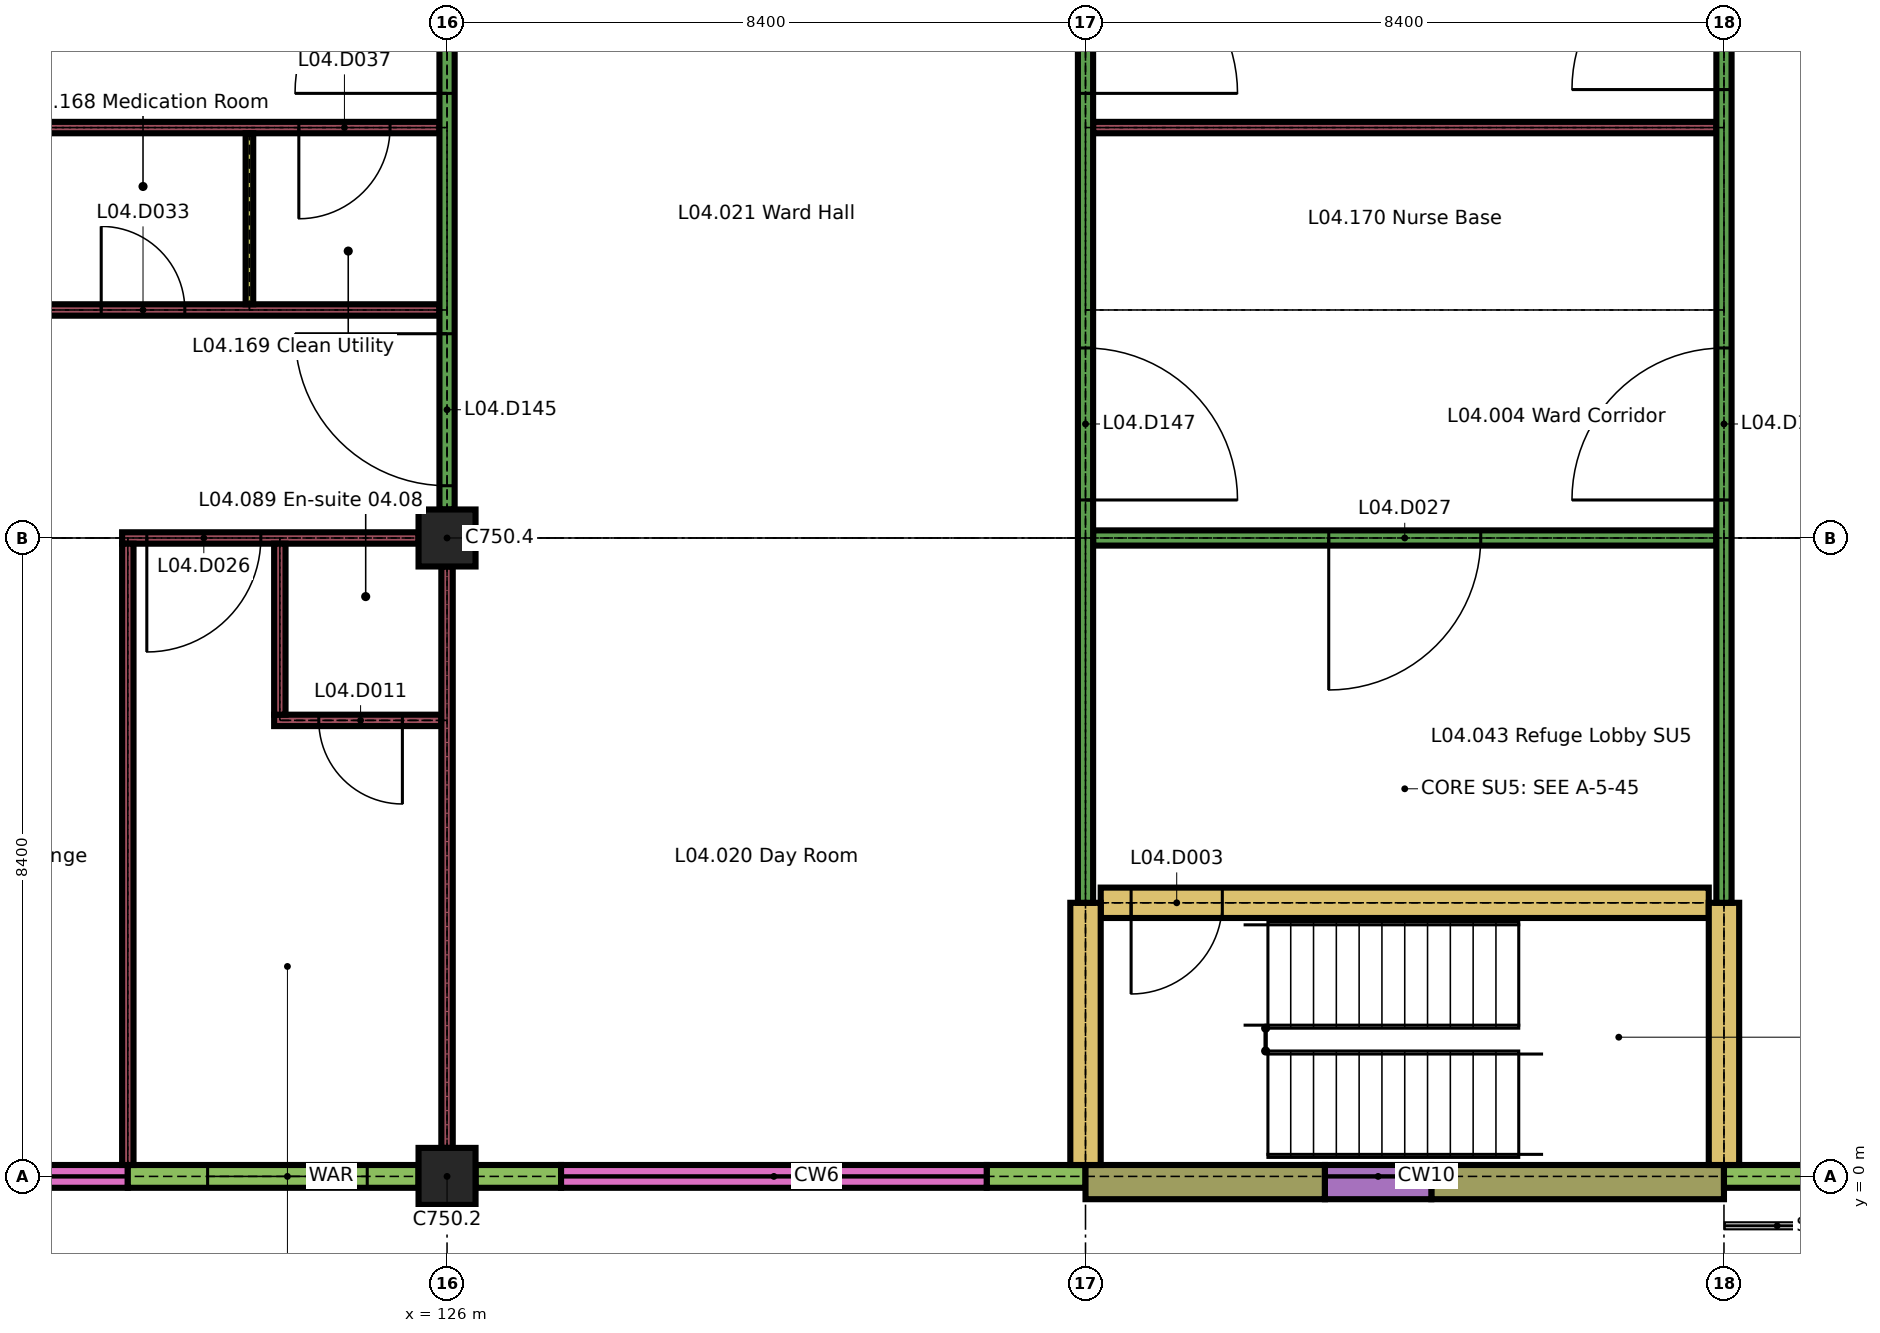
"""IFC4 building model, lengths in metres.
Left out: names, types, materials, properties, quantities, classifications, styles, units other than length and angle.
Written with IfcOpenShell. Run it as: python <this file> out.ifc"""

import sys

from ifc_helpers import new_model, si_unit, direction, frame, frame_2d, origin, origin_2d, place, context, subcontext, project, spatial, rectangle, extrude, element, fill, save


model = new_model("IFC4")
c1 = context("Model", 3, precision=1e-05, world=origin(), true_north=direction((0.0, 1.0)))
c2 = subcontext(c1, "Body", "Model", "MODEL_VIEW")
j1 = project(units=[si_unit("LENGTHUNIT", "METRE"), si_unit("PLANEANGLEUNIT", "RADIAN")], contexts=[c1])
p1 = place(None, origin())
s1 = spatial("IfcSite", under=j1, at=p1, CompositionType="ELEMENT")
p2 = place(p1, origin())
s2 = spatial("IfcBuilding", under=s1, at=p2, CompositionType="ELEMENT")
p3 = place(p2, frame((0.0, 0.0, 18.9)))
s3 = spatial("IfcBuildingStorey", under=s2, at=p3, CompositionType="ELEMENT", Elevation=18.9)
for number, where, z_axis, x_axis in (
    (1, (126.0, 0.0, 0.0), (0.0, 0.0, 1.0), (1.0, 0.0, 0.0)),
    (2, (126.0, 8.4, 0.0), (0.0, 0.0, 1.0), (1.0, 0.0, 0.0)),
):
    element("IfcColumn", number, at=place(p3, frame(where, z_axis=z_axis, x_axis=x_axis)), inside=s3, PredefinedType="COLUMN", context=c2, shape_type="SweptSolid", body=[
        extrude(rectangle(XDim=0.75, YDim=0.75, at=origin_2d()), origin(), (0.0, 0.0, 1.0), 3.26),
    ])
p4 = place(p3, frame((117.975, 0.0, 0.0), z_axis=(0.0, 0.0, 1.0), x_axis=(1.0, 0.0, 0.0)))
e3 = element("IfcWall", 3, at=p4, inside=s3, PredefinedType="SOLIDWALL", context=c2, shape_type="SweptSolid", body=[
    extrude(rectangle(XDim=3.825, YDim=0.3, at=frame_2d((1.913, 0.0))), origin(), (0.0, 0.0, 1.0), 0.6),
])
p5 = place(p3, frame((121.8, 0.0, 0.0), z_axis=(0.0, 0.0, 1.0), x_axis=(1.0, 0.0, 0.0)))
e4 = element("IfcWall", 4, at=p5, inside=s3, PredefinedType="SOLIDWALL", context=c2, shape_type="SweptSolid", body=[
    extrude(rectangle(XDim=3.825, YDim=0.3, at=frame_2d((1.913, 0.0))), origin(), (0.0, 0.0, 1.0), 2.96),
])
p6 = place(p5, frame((1.05, 0.0, 0.9)))
e5 = element("IfcOpeningElement", 5, at=p6, cuts=e4, PredefinedType="OPENING", context=c2, shape_type="SweptSolid", body=[
    extrude(rectangle(XDim=2.1, YDim=1.5, at=frame_2d((1.05, 0.75))), frame((0.0, 0.16, 0.0), z_axis=(0.0, -1.0, 0.0), x_axis=(1.0, 0.0, 0.0)), (0.0, 0.0, 1.0), 0.32),
])
p7 = place(p3, frame((126.375, 0.0, 0.0), z_axis=(0.0, 0.0, 1.0), x_axis=(1.0, 0.0, 0.0)))
e6 = element("IfcWall", 6, at=p7, inside=s3, PredefinedType="SOLIDWALL", context=c2, shape_type="SweptSolid", body=[
    extrude(rectangle(XDim=1.125, YDim=0.3, at=frame_2d((0.562, 0.0))), origin(), (0.0, 0.0, 1.0), 2.96),
])
p8 = place(p3, frame((133.1, 0.0, 0.0), z_axis=(0.0, 0.0, 1.0), x_axis=(1.0, 0.0, 0.0)))
e7 = element("IfcWall", 7, at=p8, inside=s3, PredefinedType="SOLIDWALL", context=c2, shape_type="SweptSolid", body=[
    extrude(rectangle(XDim=1.3, YDim=0.3, at=frame_2d((0.65, 0.0))), origin(), (0.0, 0.0, 1.0), 2.96),
])
p9 = place(p3, frame((127.5, 0.0, 0.0), z_axis=(0.0, 0.0, 1.0), x_axis=(1.0, 0.0, 0.0)))
e8 = element("IfcWall", 8, at=p9, inside=s3, PredefinedType="SOLIDWALL", context=c2, shape_type="SweptSolid", body=[
    extrude(rectangle(XDim=5.6, YDim=0.3, at=frame_2d((2.8, 0.0))), origin(), (0.0, 0.0, 1.0), 0.6),
])
p10 = place(p3, frame((134.4, -0.075, 0.0), z_axis=(0.0, 0.0, 1.0), x_axis=(1.0, 0.0, 0.0)))
e9 = element("IfcWall", 9, at=p10, inside=s3, PredefinedType="SOLIDWALL", context=c2, shape_type="SweptSolid", body=[
    extrude(rectangle(XDim=3.15, YDim=0.45, at=frame_2d((1.575, 0.0))), origin(), (0.0, 0.0, 1.0), 3.26),
])
p11 = place(p3, frame((138.95, -0.075, 0.0), z_axis=(0.0, 0.0, 1.0), x_axis=(1.0, 0.0, 0.0)))
e10 = element("IfcWall", 10, at=p11, inside=s3, PredefinedType="SOLIDWALL", context=c2, shape_type="SweptSolid", body=[
    extrude(rectangle(XDim=3.85, YDim=0.45, at=frame_2d((1.925, 0.0))), origin(), (0.0, 0.0, 1.0), 3.26),
])
p12 = place(p3, frame((137.55, -0.075, 0.0), z_axis=(0.0, 0.0, 1.0), x_axis=(1.0, 0.0, 0.0)))
e11 = element("IfcWall", 11, at=p12, inside=s3, PredefinedType="SOLIDWALL", context=c2, shape_type="SweptSolid", body=[
    extrude(rectangle(XDim=1.4, YDim=0.45, at=frame_2d((0.7, 0.0))), origin(), (0.0, 0.0, 1.0), 0.6),
])
p13 = place(p3, frame((142.8, 0.0, 0.0), z_axis=(0.0, 0.0, 1.0), x_axis=(1.0, 0.0, 0.0)))
e12 = element("IfcWall", 12, at=p13, inside=s3, PredefinedType="SOLIDWALL", context=c2, shape_type="SweptSolid", body=[
    extrude(rectangle(XDim=1.3, YDim=0.3, at=frame_2d((0.65, 0.0))), origin(), (0.0, 0.0, 1.0), 2.96),
])
p14 = place(p3, frame((134.6, 3.6, 0.0), z_axis=(0.0, 0.0, 1.0), x_axis=(1.0, 0.0, 0.0)))
e13 = element("IfcWall", 13, at=p14, inside=s3, PredefinedType="SHEAR", context=c2, shape_type="SweptSolid", body=[
    extrude(rectangle(XDim=8.0, YDim=0.4, at=frame_2d((4.0, 0.0))), origin(), (0.0, 0.0, 1.0), 3.26),
])
p15 = place(p14, frame((0.4, 0.0, 0.0)))
e14 = element("IfcOpeningElement", 14, at=p15, cuts=e13, PredefinedType="OPENING", context=c2, shape_type="SweptSolid", body=[
    extrude(rectangle(XDim=1.2, YDim=2.1, at=frame_2d((0.6, 1.05))), frame((0.0, 0.21, 0.0), z_axis=(0.0, -1.0, 0.0), x_axis=(1.0, 0.0, 0.0)), (0.0, 0.0, 1.0), 0.42),
])
p16 = place(p3, frame((123.725, 6.0, 0.0), z_axis=(0.0, 0.0, 1.0), x_axis=(1.0, 0.0, 0.0)))
e15 = element("IfcWall", 15, at=p16, inside=s3, PredefinedType="PARTITIONING", context=c2, shape_type="SweptSolid", body=[
    extrude(rectangle(XDim=2.2, YDim=0.15, at=frame_2d((1.1, 0.0))), origin(), (0.0, 0.0, 1.0), 3.26),
])
p17 = place(p16, frame((0.587, 0.0, 0.0)))
e16 = element("IfcOpeningElement", 16, at=p17, cuts=e15, PredefinedType="OPENING", context=c2, shape_type="SweptSolid", body=[
    extrude(rectangle(XDim=1.1, YDim=2.1, at=frame_2d((0.55, 1.05))), frame((0.0, 0.085, 0.0), z_axis=(0.0, -1.0, 0.0), x_axis=(1.0, 0.0, 0.0)), (0.0, 0.0, 1.0), 0.17),
])
p18 = place(p3, frame((121.725, 8.4, 0.0), z_axis=(0.0, 0.0, 1.0), x_axis=(1.0, 0.0, 0.0)))
e17 = element("IfcWall", 17, at=p18, inside=s3, PredefinedType="PARTITIONING", context=c2, shape_type="SweptSolid", body=[
    extrude(rectangle(XDim=3.9, YDim=0.15, at=frame_2d((1.95, 0.0))), origin(), (0.0, 0.0, 1.0), 3.26),
])
p19 = place(p18, frame((0.325, 0.0, 0.0)))
e18 = element("IfcOpeningElement", 18, at=p19, cuts=e17, PredefinedType="OPENING", context=c2, shape_type="SweptSolid", body=[
    extrude(rectangle(XDim=1.5, YDim=2.4, at=frame_2d((0.75, 1.2))), frame((0.0, 0.085, 0.0), z_axis=(0.0, -1.0, 0.0), x_axis=(1.0, 0.0, 0.0)), (0.0, 0.0, 1.0), 0.17),
])
p20 = place(p3, frame((134.5, 8.4, 0.0), z_axis=(0.0, 0.0, 1.0), x_axis=(1.0, 0.0, 0.0)))
e19 = element("IfcWall", 19, at=p20, inside=s3, PredefinedType="PARTITIONING", context=c2, shape_type="SweptSolid", body=[
    extrude(rectangle(XDim=8.2, YDim=0.2, at=frame_2d((4.1, 0.0))), origin(), (0.0, 0.0, 1.0), 3.26),
])
p21 = place(p20, frame((3.1, 0.0, 0.0)))
e20 = element("IfcOpeningElement", 20, at=p21, cuts=e19, PredefinedType="OPENING", context=c2, shape_type="SweptSolid", body=[
    extrude(rectangle(XDim=2.0, YDim=2.4, at=frame_2d((1.0, 1.2))), frame((0.0, 0.11, 0.0), z_axis=(0.0, -1.0, 0.0), x_axis=(1.0, 0.0, 0.0)), (0.0, 0.0, 1.0), 0.22),
])
p22 = place(p3, frame((120.525, 11.4, 0.0), z_axis=(0.0, 0.0, 1.0), x_axis=(1.0, 0.0, 0.0)))
e21 = element("IfcWall", 21, at=p22, inside=s3, PredefinedType="PARTITIONING", context=c2, shape_type="SweptSolid", body=[
    extrude(rectangle(XDim=5.375, YDim=0.15, at=frame_2d((2.688, 0.0))), origin(), (0.0, 0.0, 1.0), 3.26),
])
p23 = place(p22, frame((0.925, 0.0, 0.0)))
e22 = element("IfcOpeningElement", 22, at=p23, cuts=e21, PredefinedType="OPENING", context=c2, shape_type="SweptSolid", body=[
    extrude(rectangle(XDim=1.1, YDim=2.1, at=frame_2d((0.55, 1.05))), frame((0.0, 0.085, 0.0), z_axis=(0.0, -1.0, 0.0), x_axis=(1.0, 0.0, 0.0)), (0.0, 0.0, 1.0), 0.17),
])
p24 = place(p3, frame((112.125, 13.8, 0.0), z_axis=(0.0, 0.0, 1.0), x_axis=(1.0, 0.0, 0.0)))
e23 = element("IfcWall", 23, at=p24, inside=s3, PredefinedType="PARTITIONING", context=c2, shape_type="SweptSolid", body=[
    extrude(rectangle(XDim=13.775, YDim=0.15, at=frame_2d((6.887, 0.0))), origin(), (0.0, 0.0, 1.0), 3.26),
])
p25 = place(p24, frame((11.925, 0.0, 0.0)))
e24 = element("IfcOpeningElement", 24, at=p25, cuts=e23, PredefinedType="OPENING", context=c2, shape_type="SweptSolid", body=[
    extrude(rectangle(XDim=1.2, YDim=2.1, at=frame_2d((0.6, 1.05))), frame((0.0, 0.085, 0.0), z_axis=(0.0, -1.0, 0.0), x_axis=(1.0, 0.0, 0.0)), (0.0, 0.0, 1.0), 0.17),
])
p26 = place(p3, frame((134.5, 13.8, 0.0), z_axis=(0.0, 0.0, 1.0), x_axis=(1.0, 0.0, 0.0)))
e25 = element("IfcWall", 25, at=p26, inside=s3, PredefinedType="PARTITIONING", context=c2, shape_type="SweptSolid", body=[
    extrude(rectangle(XDim=8.2, YDim=0.15, at=frame_2d((4.1, 0.0))), origin(), (0.0, 0.0, 1.0), 3.26),
])
p27 = place(p3, frame((121.8, 0.15, 0.0), z_axis=(0.0, 0.0, 1.0), x_axis=(0.0, 1.0, 0.0)))
e26 = element("IfcWall", 26, at=p27, inside=s3, PredefinedType="PARTITIONING", context=c2, shape_type="SweptSolid", body=[
    extrude(rectangle(XDim=8.175, YDim=0.15, at=frame_2d((4.087, 0.0))), origin(), (0.0, 0.0, 1.0), 3.26),
])
p28 = place(p3, frame((123.4, 11.475, 0.0), z_axis=(0.0, 0.0, 1.0), x_axis=(0.0, 1.0, 0.0)))
e27 = element("IfcWall", 27, at=p28, inside=s3, PredefinedType="PARTITIONING", context=c2, shape_type="SweptSolid", body=[
    extrude(rectangle(XDim=2.25, YDim=0.1, at=frame_2d((1.125, 0.0))), origin(), (0.0, 0.0, 1.0), 3.26),
])
p29 = place(p3, frame((123.8, 6.075, 0.0), z_axis=(0.0, 0.0, 1.0), x_axis=(0.0, 1.0, 0.0)))
e28 = element("IfcWall", 28, at=p29, inside=s3, PredefinedType="PARTITIONING", context=c2, shape_type="SweptSolid", body=[
    extrude(rectangle(XDim=2.25, YDim=0.15, at=frame_2d((1.125, 0.0))), origin(), (0.0, 0.0, 1.0), 3.26),
])
p30 = place(p3, frame((126.0, 0.375, 0.0), z_axis=(0.0, 0.0, 1.0), x_axis=(0.0, 1.0, 0.0)))
e29 = element("IfcWall", 29, at=p30, inside=s3, PredefinedType="PARTITIONING", context=c2, shape_type="SweptSolid", body=[
    extrude(rectangle(XDim=7.65, YDim=0.15, at=frame_2d((3.825, 0.0))), origin(), (0.0, 0.0, 1.0), 3.26),
])
p31 = place(p3, frame((126.0, 8.775, 0.0), z_axis=(0.0, 0.0, 1.0), x_axis=(0.0, 1.0, 0.0)))
e30 = element("IfcWall", 30, at=p31, inside=s3, PredefinedType="PARTITIONING", context=c2, shape_type="SweptSolid", body=[
    extrude(rectangle(XDim=7.925, YDim=0.2, at=frame_2d((3.962, 0.0))), origin(), (0.0, 0.0, 1.0), 3.26),
])
p32 = place(p31, frame((0.312, 0.0, 0.0)))
e31 = element("IfcOpeningElement", 31, at=p32, cuts=e30, PredefinedType="OPENING", context=c2, shape_type="SweptSolid", body=[
    extrude(rectangle(XDim=2.0, YDim=2.4, at=frame_2d((1.0, 1.2))), frame((0.0, 0.11, 0.0), z_axis=(0.0, -1.0, 0.0), x_axis=(1.0, 0.0, 0.0)), (0.0, 0.0, 1.0), 0.22),
])
p33 = place(p31, frame((5.475, 0.0, 0.0)))
e32 = element("IfcOpeningElement", 32, at=p33, cuts=e30, PredefinedType="OPENING", context=c2, shape_type="SweptSolid", body=[
    extrude(rectangle(XDim=2.0, YDim=2.4, at=frame_2d((1.0, 1.2))), frame((0.0, 0.11, 0.0), z_axis=(0.0, -1.0, 0.0), x_axis=(1.0, 0.0, 0.0)), (0.0, 0.0, 1.0), 0.22),
])
p34 = place(p3, frame((134.4, 0.15, 0.0), z_axis=(0.0, 0.0, 1.0), x_axis=(0.0, 1.0, 0.0)))
e33 = element("IfcWall", 33, at=p34, inside=s3, PredefinedType="SHEAR", context=c2, shape_type="SweptSolid", body=[
    extrude(rectangle(XDim=3.45, YDim=0.4, at=frame_2d((1.725, 0.0))), origin(), (0.0, 0.0, 1.0), 3.26),
])
p35 = place(p3, frame((134.4, 3.6, 0.0), z_axis=(0.0, 0.0, 1.0), x_axis=(0.0, 1.0, 0.0)))
e34 = element("IfcWall", 34, at=p35, inside=s3, PredefinedType="PARTITIONING", context=c2, shape_type="SweptSolid", body=[
    extrude(rectangle(XDim=13.1, YDim=0.2, at=frame_2d((6.55, 0.0))), origin(), (0.0, 0.0, 1.0), 3.26),
])
p36 = place(p35, frame((5.3, 0.0, 0.0)))
e35 = element("IfcOpeningElement", 35, at=p36, cuts=e34, PredefinedType="OPENING", context=c2, shape_type="SweptSolid", body=[
    extrude(rectangle(XDim=2.0, YDim=2.4, at=frame_2d((1.0, 1.2))), frame((0.0, 0.11, 0.0), z_axis=(0.0, -1.0, 0.0), x_axis=(1.0, 0.0, 0.0)), (0.0, 0.0, 1.0), 0.22),
])
p37 = place(p35, frame((10.65, 0.0, 0.0)))
e36 = element("IfcOpeningElement", 36, at=p37, cuts=e34, PredefinedType="OPENING", context=c2, shape_type="SweptSolid", body=[
    extrude(rectangle(XDim=2.0, YDim=2.4, at=frame_2d((1.0, 1.2))), frame((0.0, 0.11, 0.0), z_axis=(0.0, -1.0, 0.0), x_axis=(1.0, 0.0, 0.0)), (0.0, 0.0, 1.0), 0.22),
])
p38 = place(p3, frame((142.8, 0.15, 0.0), z_axis=(0.0, 0.0, 1.0), x_axis=(0.0, 1.0, 0.0)))
e37 = element("IfcWall", 37, at=p38, inside=s3, PredefinedType="SHEAR", context=c2, shape_type="SweptSolid", body=[
    extrude(rectangle(XDim=3.45, YDim=0.4, at=frame_2d((1.725, 0.0))), origin(), (0.0, 0.0, 1.0), 3.26),
])
p39 = place(p3, frame((142.8, 3.6, 0.0), z_axis=(0.0, 0.0, 1.0), x_axis=(0.0, 1.0, 0.0)))
e38 = element("IfcWall", 38, at=p39, inside=s3, PredefinedType="PARTITIONING", context=c2, shape_type="SweptSolid", body=[
    extrude(rectangle(XDim=18.0, YDim=0.2, at=frame_2d((9.0, 0.0))), origin(), (0.0, 0.0, 1.0), 3.26),
])
p40 = place(p39, frame((5.3, 0.0, 0.0)))
e39 = element("IfcOpeningElement", 39, at=p40, cuts=e38, PredefinedType="OPENING", context=c2, shape_type="SweptSolid", body=[
    extrude(rectangle(XDim=2.0, YDim=2.4, at=frame_2d((1.0, 1.2))), frame((0.0, 0.11, 0.0), z_axis=(0.0, -1.0, 0.0), x_axis=(1.0, 0.0, 0.0)), (0.0, 0.0, 1.0), 0.22),
])
p41 = place(p39, frame((10.7, 0.0, 0.0)))
e40 = element("IfcOpeningElement", 40, at=p41, cuts=e38, PredefinedType="OPENING", context=c2, shape_type="SweptSolid", body=[
    extrude(rectangle(XDim=2.0, YDim=2.4, at=frame_2d((1.0, 1.2))), frame((0.0, 0.11, 0.0), z_axis=(0.0, -1.0, 0.0), x_axis=(1.0, 0.0, 0.0)), (0.0, 0.0, 1.0), 0.22),
])
p42 = place(p6, origin())
e41 = element("IfcWindow", 41, at=p42, inside=s3, PartitioningType="DOUBLE_PANEL_VERTICAL", PredefinedType="WINDOW", context=c2, shape_type="SweptSolid", body=[
    extrude(rectangle(XDim=2.1, YDim=1.5, at=frame_2d((1.05, 0.75))), frame((0.0, 0.05, 0.0), z_axis=(0.0, -1.0, 0.0), x_axis=(1.0, 0.0, 0.0)), (0.0, 0.0, 1.0), 0.1),
])
fill(e5, e41)
p43 = place(p15, origin())
e42 = element("IfcDoor", 42, at=p43, inside=s3, OperationType="SINGLE_SWING_LEFT", PredefinedType="DOOR", context=c2, shape_type="SweptSolid", body=[
    extrude(rectangle(XDim=1.2, YDim=2.1, at=frame_2d((0.6, 1.05))), frame((0.0, 0.025, 0.0), z_axis=(0.0, -1.0, 0.0), x_axis=(1.0, 0.0, 0.0)), (0.0, 0.0, 1.0), 0.05),
])
fill(e14, e42)
p44 = place(p17, origin())
e43 = element("IfcDoor", 43, at=p44, inside=s3, OperationType="SINGLE_SWING_RIGHT", PredefinedType="DOOR", context=c2, shape_type="SweptSolid", body=[
    extrude(rectangle(XDim=1.1, YDim=2.1, at=frame_2d((0.55, 1.05))), frame((0.0, 0.025, 0.0), z_axis=(0.0, -1.0, 0.0), x_axis=(1.0, 0.0, 0.0)), (0.0, 0.0, 1.0), 0.05),
])
fill(e16, e43)
p45 = place(p19, origin())
e44 = element("IfcDoor", 44, at=p45, inside=s3, OperationType="SINGLE_SWING_LEFT", PredefinedType="DOOR", context=c2, shape_type="SweptSolid", body=[
    extrude(rectangle(XDim=1.5, YDim=2.4, at=frame_2d((0.75, 1.2))), frame((0.0, 0.03, 0.0), z_axis=(0.0, -1.0, 0.0), x_axis=(1.0, 0.0, 0.0)), (0.0, 0.0, 1.0), 0.06),
])
fill(e18, e44)
p46 = place(p21, origin())
e45 = element("IfcDoor", 45, at=p46, inside=s3, OperationType="SINGLE_SWING_LEFT", PredefinedType="DOOR", context=c2, shape_type="SweptSolid", body=[
    extrude(rectangle(XDim=2.0, YDim=2.4, at=frame_2d((1.0, 1.2))), frame((0.0, 0.03, 0.0), z_axis=(0.0, -1.0, 0.0), x_axis=(1.0, 0.0, 0.0)), (0.0, 0.0, 1.0), 0.06),
])
fill(e20, e45)
p47 = place(p23, origin())
e46 = element("IfcDoor", 46, at=p47, inside=s3, OperationType="SINGLE_SWING_RIGHT", PredefinedType="DOOR", context=c2, shape_type="SweptSolid", body=[
    extrude(rectangle(XDim=1.1, YDim=2.1, at=frame_2d((0.55, 1.05))), frame((0.0, 0.025, 0.0), z_axis=(0.0, -1.0, 0.0), x_axis=(1.0, 0.0, 0.0)), (0.0, 0.0, 1.0), 0.05),
])
fill(e22, e46)
p48 = place(p25, origin())
e47 = element("IfcDoor", 47, at=p48, inside=s3, OperationType="SINGLE_SWING_LEFT", PredefinedType="DOOR", context=c2, shape_type="SweptSolid", body=[
    extrude(rectangle(XDim=1.2, YDim=2.1, at=frame_2d((0.6, 1.05))), frame((0.0, 0.025, 0.0), z_axis=(0.0, -1.0, 0.0), x_axis=(1.0, 0.0, 0.0)), (0.0, 0.0, 1.0), 0.05),
])
fill(e24, e47)
p49 = place(p32, origin())
e48 = element("IfcDoor", 48, at=p49, inside=s3, OperationType="SINGLE_SWING_LEFT", PredefinedType="DOOR", context=c2, shape_type="SweptSolid", body=[
    extrude(rectangle(XDim=2.0, YDim=2.4, at=frame_2d((1.0, 1.2))), frame((0.0, 0.03, 0.0), z_axis=(0.0, -1.0, 0.0), x_axis=(1.0, 0.0, 0.0)), (0.0, 0.0, 1.0), 0.06),
])
fill(e31, e48)
p50 = place(p33, origin())
e49 = element("IfcDoor", 49, at=p50, inside=s3, OperationType="SINGLE_SWING_RIGHT", PredefinedType="DOOR", context=c2, shape_type="SweptSolid", body=[
    extrude(rectangle(XDim=2.0, YDim=2.4, at=frame_2d((1.0, 1.2))), frame((0.0, 0.03, 0.0), z_axis=(0.0, -1.0, 0.0), x_axis=(1.0, 0.0, 0.0)), (0.0, 0.0, 1.0), 0.06),
])
fill(e32, e49)
p51 = place(p36, origin())
e50 = element("IfcDoor", 50, at=p51, inside=s3, OperationType="SINGLE_SWING_LEFT", PredefinedType="DOOR", context=c2, shape_type="SweptSolid", body=[
    extrude(rectangle(XDim=2.0, YDim=2.4, at=frame_2d((1.0, 1.2))), frame((0.0, 0.03, 0.0), z_axis=(0.0, -1.0, 0.0), x_axis=(1.0, 0.0, 0.0)), (0.0, 0.0, 1.0), 0.06),
])
fill(e35, e50)
p52 = place(p37, origin())
e51 = element("IfcDoor", 51, at=p52, inside=s3, OperationType="SINGLE_SWING_LEFT", PredefinedType="DOOR", context=c2, shape_type="SweptSolid", body=[
    extrude(rectangle(XDim=2.0, YDim=2.4, at=frame_2d((1.0, 1.2))), frame((0.0, 0.03, 0.0), z_axis=(0.0, -1.0, 0.0), x_axis=(1.0, 0.0, 0.0)), (0.0, 0.0, 1.0), 0.06),
])
fill(e36, e51)
p53 = place(p40, origin())
e52 = element("IfcDoor", 52, at=p53, inside=s3, OperationType="SINGLE_SWING_RIGHT", PredefinedType="DOOR", context=c2, shape_type="SweptSolid", body=[
    extrude(rectangle(XDim=2.0, YDim=2.4, at=frame_2d((1.0, 1.2))), frame((0.0, 0.03, 0.0), z_axis=(0.0, -1.0, 0.0), x_axis=(1.0, 0.0, 0.0)), (0.0, 0.0, 1.0), 0.06),
])
fill(e39, e52)
p54 = place(p41, origin())
e53 = element("IfcDoor", 53, at=p54, inside=s3, OperationType="SINGLE_SWING_RIGHT", PredefinedType="DOOR", context=c2, shape_type="SweptSolid", body=[
    extrude(rectangle(XDim=2.0, YDim=2.4, at=frame_2d((1.0, 1.2))), frame((0.0, 0.03, 0.0), z_axis=(0.0, -1.0, 0.0), x_axis=(1.0, 0.0, 0.0)), (0.0, 0.0, 1.0), 0.06),
])
fill(e40, e53)
save(model, sys.argv[1])
